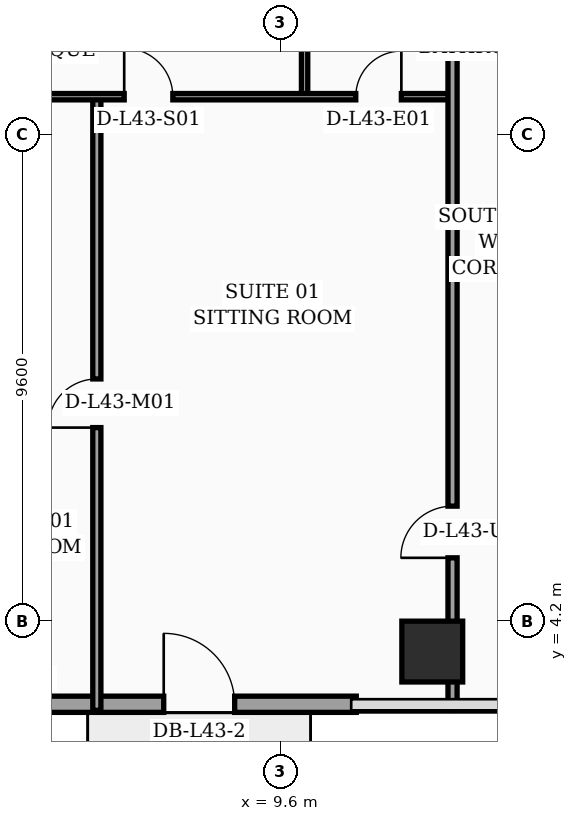
"""IFC4 building model, lengths in metres.
Left out: names, types, materials, properties, quantities, classifications, styles, units other than length and angle.
Written with IfcOpenShell. Run it as: python <this file> out.ifc"""

import sys

from ifc_helpers import new_model, si_unit, direction, frame, frame_2d, origin, origin_2d, place, context, subcontext, project, spatial, rectangle, extrude, element, fill, save


model = new_model("IFC4")
c1 = context("Model", 3, precision=1e-05, world=origin(), true_north=direction((0.0, 1.0)))
c2 = subcontext(c1, "Body", "Model", "MODEL_VIEW")
j1 = project(units=[si_unit("LENGTHUNIT", "METRE"), si_unit("PLANEANGLEUNIT", "RADIAN")], contexts=[c1])
p1 = place(None, origin())
s1 = spatial("IfcSite", under=j1, at=p1, CompositionType="ELEMENT")
p2 = place(p1, origin())
s2 = spatial("IfcBuilding", under=s1, at=p2, CompositionType="ELEMENT")
p3 = place(p2, frame((0.0, 0.0, 175.1)))
s3 = spatial("IfcBuildingStorey", under=s2, at=p3, CompositionType="ELEMENT", Elevation=175.1)
p4 = place(p3, frame((12.6, 3.6, 0.0), z_axis=(0.0, 0.0, 1.0), x_axis=(1.0, 0.0, 0.0)))
e1 = element("IfcColumn", 1, at=p4, inside=s3, PredefinedType="COLUMN", context=c2, shape_type="SweptSolid", body=[
    extrude(rectangle(XDim=1.2, YDim=1.2, at=origin_2d()), origin(), (0.0, 0.0, 1.0), 3.56),
])
p5 = place(p3, frame((3.1, 2.56, 0.0), z_axis=(0.0, 0.0, 1.0), x_axis=(1.0, 0.0, 0.0)))
e2 = element("IfcWall", 2, at=p5, inside=s3, PredefinedType="SOLIDWALL", context=c2, shape_type="SweptSolid", body=[
    extrude(rectangle(XDim=8.0, YDim=0.32, at=frame_2d((4.0, 0.0))), origin(), (0.0, 0.0, 1.0), 3.56),
])
p6 = place(p5, frame((0.45, 0.0, 0.75)))
e3 = element("IfcOpeningElement", 3, at=p6, cuts=e2, PredefinedType="OPENING", context=c2, shape_type="SweptSolid", body=[
    extrude(rectangle(XDim=1.0, YDim=1.6, at=frame_2d((0.5, 0.8))), frame((0.0, 0.17, 0.0), z_axis=(0.0, -1.0, 0.0), x_axis=(1.0, 0.0, 0.0)), (0.0, 0.0, 1.0), 0.34),
])
p7 = place(p5, frame((4.2, 0.0, 0.0)))
e4 = element("IfcOpeningElement", 4, at=p7, cuts=e2, PredefinedType="OPENING", context=c2, shape_type="SweptSolid", body=[
    extrude(rectangle(XDim=1.4, YDim=2.25, at=frame_2d((0.7, 1.125))), frame((0.0, 0.17, 0.0), z_axis=(0.0, -1.0, 0.0), x_axis=(1.0, 0.0, 0.0)), (0.0, 0.0, 1.0), 0.34),
])
p8 = place(p3, frame((10.08, 14.55, 0.0), z_axis=(0.0, 0.0, 1.0), x_axis=(0.0, 1.0, 0.0)))
e5 = element("IfcWall", 5, at=p8, inside=s3, PredefinedType="PARTITIONING", context=c2, shape_type="SweptSolid", body=[
    extrude(rectangle(XDim=2.25, YDim=0.125, at=frame_2d((1.125, 0.0))), origin(), (0.0, 0.0, 1.0), 3.56),
])
p9 = place(p3, frame((5.98, 2.44, 0.0), z_axis=(0.0, 0.0, 1.0), x_axis=(0.0, 1.0, 0.0)))
e6 = element("IfcWall", 6, at=p9, inside=s3, PredefinedType="PARTITIONING", context=c2, shape_type="SweptSolid", body=[
    extrude(rectangle(XDim=12.11, YDim=0.16, at=frame_2d((6.055, 0.0))), origin(), (0.0, 0.0, 1.0), 3.04),
])
p10 = place(p9, frame((5.58, 0.0, 0.0)))
e7 = element("IfcOpeningElement", 7, at=p10, cuts=e6, PredefinedType="OPENING", context=c2, shape_type="SweptSolid", body=[
    extrude(rectangle(XDim=0.96, YDim=2.2, at=frame_2d((0.48, 1.1))), frame((0.0, 0.09, 0.0), z_axis=(0.0, -1.0, 0.0), x_axis=(1.0, 0.0, 0.0)), (0.0, 0.0, 1.0), 0.18),
])
p11 = place(p3, frame((3.2, 14.55, 0.0), z_axis=(0.0, 0.0, 1.0), x_axis=(1.0, 0.0, 0.0)))
e8 = element("IfcWall", 8, at=p11, inside=s3, PredefinedType="PARTITIONING", context=c2, shape_type="SweptSolid", body=[
    extrude(rectangle(XDim=9.8, YDim=0.125, at=frame_2d((4.9, 0.0))), origin(), (0.0, 0.0, 1.0), 2.94),
])
p12 = place(p11, frame((3.32, 0.0, 0.0)))
e9 = element("IfcOpeningElement", 9, at=p12, cuts=e8, PredefinedType="OPENING", context=c2, shape_type="SweptSolid", body=[
    extrude(rectangle(XDim=0.96, YDim=2.2, at=frame_2d((0.48, 1.1))), frame((0.0, 0.073, 0.0), z_axis=(0.0, -1.0, 0.0), x_axis=(1.0, 0.0, 0.0)), (0.0, 0.0, 1.0), 0.145),
])
p13 = place(p11, frame((7.89, 0.0, 0.0)))
e10 = element("IfcOpeningElement", 10, at=p13, cuts=e8, PredefinedType="OPENING", context=c2, shape_type="SweptSolid", body=[
    extrude(rectangle(XDim=0.9, YDim=2.15, at=frame_2d((0.45, 1.075))), frame((0.0, 0.073, 0.0), z_axis=(0.0, -1.0, 0.0), x_axis=(1.0, 0.0, 0.0)), (0.0, 0.0, 1.0), 0.145),
])
p14 = place(p3, frame((13.0, 2.44, 0.0), z_axis=(0.0, 0.0, 1.0), x_axis=(0.0, 1.0, 0.0)))
e11 = element("IfcWall", 11, at=p14, inside=s3, PredefinedType="PARTITIONING", context=c2, shape_type="SweptSolid", body=[
    extrude(rectangle(XDim=14.36, YDim=0.18, at=frame_2d((7.18, 0.0))), origin(), (0.0, 0.0, 1.0), 2.94),
])
p15 = place(p14, frame((3.01, 0.0, 0.0)))
e12 = element("IfcOpeningElement", 12, at=p15, cuts=e11, PredefinedType="OPENING", context=c2, shape_type="SweptSolid", body=[
    extrude(rectangle(XDim=1.02, YDim=2.2, at=frame_2d((0.51, 1.1))), frame((0.0, 0.1, 0.0), z_axis=(0.0, -1.0, 0.0), x_axis=(1.0, 0.0, 0.0)), (0.0, 0.0, 1.0), 0.2),
])
p16 = place(p7, origin())
e13 = element("IfcDoor", 13, at=p16, inside=s3, OperationType="SINGLE_SWING_LEFT", PredefinedType="DOOR", context=c2, shape_type="SweptSolid", body=[
    extrude(rectangle(XDim=1.4, YDim=2.25, at=frame_2d((0.7, 1.125))), frame((0.0, 0.025, 0.0), z_axis=(0.0, -1.0, 0.0), x_axis=(1.0, 0.0, 0.0)), (0.0, 0.0, 1.0), 0.05),
])
fill(e4, e13)
p17 = place(p10, origin())
e14 = element("IfcDoor", 14, at=p17, inside=s3, OperationType="SINGLE_SWING_LEFT", PredefinedType="DOOR", context=c2, shape_type="SweptSolid", body=[
    extrude(rectangle(XDim=0.96, YDim=2.2, at=frame_2d((0.48, 1.1))), frame((0.0, 0.025, 0.0), z_axis=(0.0, -1.0, 0.0), x_axis=(1.0, 0.0, 0.0)), (0.0, 0.0, 1.0), 0.05),
])
fill(e7, e14)
p18 = place(p12, origin())
e15 = element("IfcDoor", 15, at=p18, inside=s3, OperationType="SINGLE_SWING_LEFT", PredefinedType="DOOR", context=c2, shape_type="SweptSolid", body=[
    extrude(rectangle(XDim=0.96, YDim=2.2, at=frame_2d((0.48, 1.1))), frame((0.0, 0.025, 0.0), z_axis=(0.0, -1.0, 0.0), x_axis=(1.0, 0.0, 0.0)), (0.0, 0.0, 1.0), 0.05),
])
fill(e9, e15)
p19 = place(p13, origin())
e16 = element("IfcDoor", 16, at=p19, inside=s3, OperationType="SINGLE_SWING_RIGHT", PredefinedType="DOOR", context=c2, shape_type="SweptSolid", body=[
    extrude(rectangle(XDim=0.9, YDim=2.15, at=frame_2d((0.45, 1.075))), frame((0.0, 0.025, 0.0), z_axis=(0.0, -1.0, 0.0), x_axis=(1.0, 0.0, 0.0)), (0.0, 0.0, 1.0), 0.05),
])
fill(e10, e16)
p20 = place(p15, origin())
e17 = element("IfcDoor", 17, at=p20, inside=s3, OperationType="SINGLE_SWING_LEFT", PredefinedType="DOOR", context=c2, shape_type="SweptSolid", body=[
    extrude(rectangle(XDim=1.02, YDim=2.2, at=frame_2d((0.51, 1.1))), frame((0.0, 0.025, 0.0), z_axis=(0.0, -1.0, 0.0), x_axis=(1.0, 0.0, 0.0)), (0.0, 0.0, 1.0), 0.05),
])
fill(e12, e17)
save(model, sys.argv[1])
